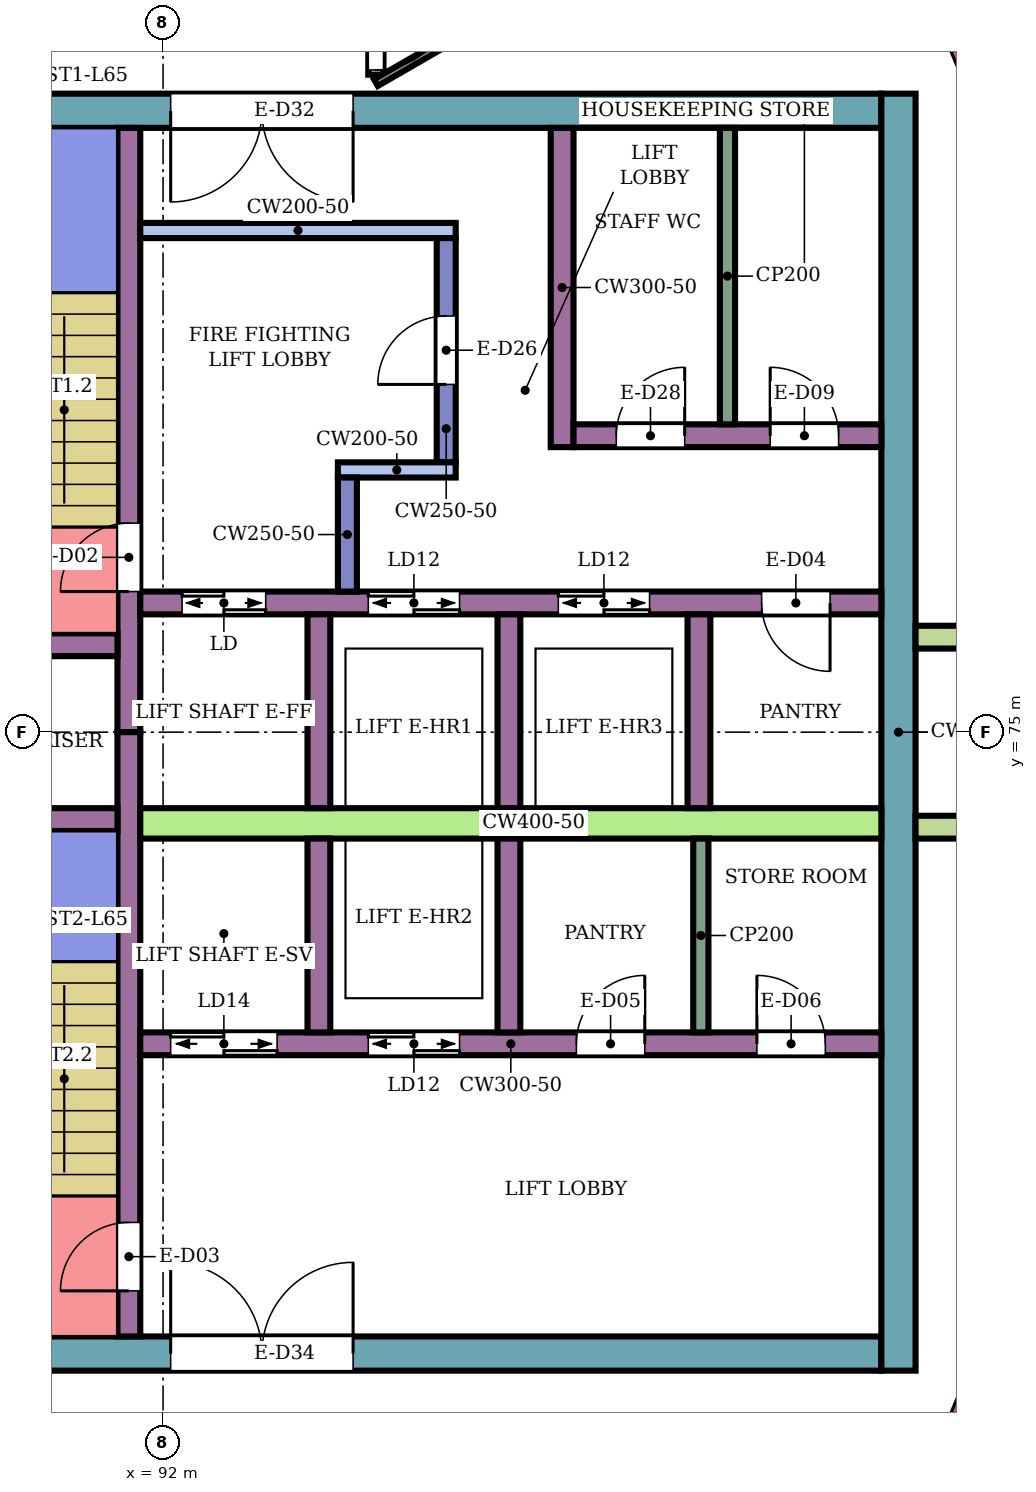
"""IFC4 building model, lengths in metres.
Left out: names, types, materials, properties, quantities, classifications, styles, units other than length and angle.
Written with IfcOpenShell. Run it as: python <this file> out.ifc"""

import sys

from ifc_helpers import new_model, si_unit, direction, frame, frame_2d, origin, place, context, subcontext, project, spatial, rectangle, extrude, element, fill, save


model = new_model("IFC4")
c1 = context("Model", 3, precision=1e-05, world=origin(), true_north=direction((0.0, 1.0)))
c2 = subcontext(c1, "Body", "Model", "MODEL_VIEW")
j1 = project(units=[si_unit("LENGTHUNIT", "METRE"), si_unit("PLANEANGLEUNIT", "RADIAN")], contexts=[c1])
p1 = place(None, origin())
s1 = spatial("IfcSite", under=j1, at=p1, CompositionType="ELEMENT")
p2 = place(p1, origin())
s2 = spatial("IfcBuilding", under=s1, at=p2, CompositionType="ELEMENT")
p3 = place(p2, frame((0.0, 0.0, 284.1)))
s3 = spatial("IfcBuildingStorey", under=s2, at=p3, CompositionType="ELEMENT", Elevation=284.1)
p4 = place(p3, frame((87.9, 83.175, 0.0), z_axis=(0.0, 0.0, 1.0), x_axis=(1.0, 0.0, 0.0)))
e1 = element("IfcWall", 1, at=p4, inside=s3, PredefinedType="SHEAR", context=c2, shape_type="SweptSolid", body=[
    extrude(rectangle(XDim=13.55, YDim=0.45, at=frame_2d((6.775, 0.0))), origin(), (0.0, 0.0, 1.0), 3.88),
])
p5 = place(p4, frame((4.2, 0.0, 0.0)))
e2 = element("IfcOpeningElement", 2, at=p5, cuts=e1, PredefinedType="OPENING", context=c2, shape_type="SweptSolid", body=[
    extrude(rectangle(XDim=2.4, YDim=2.4, at=frame_2d((1.2, 1.2))), frame((0.0, 0.235, 0.0), z_axis=(0.0, -1.0, 0.0), x_axis=(1.0, 0.0, 0.0)), (0.0, 0.0, 1.0), 0.47),
])
p6 = place(p3, frame((87.9, 66.825, 0.0), z_axis=(0.0, 0.0, 1.0), x_axis=(1.0, 0.0, 0.0)))
e3 = element("IfcWall", 3, at=p6, inside=s3, PredefinedType="SHEAR", context=c2, shape_type="SweptSolid", body=[
    extrude(rectangle(XDim=13.55, YDim=0.45, at=frame_2d((6.775, 0.0))), origin(), (0.0, 0.0, 1.0), 3.88),
])
p7 = place(p6, frame((4.2, 0.0, 0.0)))
e4 = element("IfcOpeningElement", 4, at=p7, cuts=e3, PredefinedType="OPENING", context=c2, shape_type="SweptSolid", body=[
    extrude(rectangle(XDim=2.4, YDim=2.4, at=frame_2d((1.2, 1.2))), frame((0.0, 0.235, 0.0), z_axis=(0.0, -1.0, 0.0), x_axis=(1.0, 0.0, 0.0)), (0.0, 0.0, 1.0), 0.47),
])
p8 = place(p3, frame((101.675, 66.6, 0.0), z_axis=(0.0, 0.0, 1.0), x_axis=(0.0, 1.0, 0.0)))
e5 = element("IfcWall", 5, at=p8, inside=s3, PredefinedType="SHEAR", context=c2, shape_type="SweptSolid", body=[
    extrude(rectangle(XDim=16.8, YDim=0.45, at=frame_2d((8.4, 0.0))), origin(), (0.0, 0.0, 1.0), 3.88),
])
p9 = place(p3, frame((91.55, 75.0, 0.0), z_axis=(0.0, 0.0, 1.0), x_axis=(0.0, 1.0, 0.0)))
e6 = element("IfcWall", 6, at=p9, inside=s3, PredefinedType="SHEAR", context=c2, shape_type="SweptSolid", body=[
    extrude(rectangle(XDim=7.95, YDim=0.3, at=frame_2d((3.975, 0.0))), origin(), (0.0, 0.0, 1.0), 3.88),
])
p10 = place(p9, frame((1.85, 0.0, 0.0)))
e7 = element("IfcOpeningElement", 7, at=p10, cuts=e6, PredefinedType="OPENING", context=c2, shape_type="SweptSolid", body=[
    extrude(rectangle(XDim=0.9, YDim=2.1, at=frame_2d((0.45, 1.05))), frame((0.0, 0.16, 0.0), z_axis=(0.0, -1.0, 0.0), x_axis=(1.0, 0.0, 0.0)), (0.0, 0.0, 1.0), 0.32),
])
p11 = place(p3, frame((91.55, 67.05, 0.0), z_axis=(0.0, 0.0, 1.0), x_axis=(0.0, 1.0, 0.0)))
e8 = element("IfcWall", 8, at=p11, inside=s3, PredefinedType="SHEAR", context=c2, shape_type="SweptSolid", body=[
    extrude(rectangle(XDim=7.95, YDim=0.3, at=frame_2d((3.975, 0.0))), origin(), (0.0, 0.0, 1.0), 3.88),
])
p12 = place(p11, frame((0.6, 0.0, 0.0)))
e9 = element("IfcOpeningElement", 9, at=p12, cuts=e8, PredefinedType="OPENING", context=c2, shape_type="SweptSolid", body=[
    extrude(rectangle(XDim=0.9, YDim=2.1, at=frame_2d((0.45, 1.05))), frame((0.0, 0.16, 0.0), z_axis=(0.0, -1.0, 0.0), x_axis=(1.0, 0.0, 0.0)), (0.0, 0.0, 1.0), 0.32),
])
p13 = place(p3, frame((88.35, 76.15, 0.0), z_axis=(0.0, 0.0, 1.0), x_axis=(1.0, 0.0, 0.0)))
e10 = element("IfcWall", 10, at=p13, inside=s3, PredefinedType="SHEAR", context=c2, shape_type="SweptSolid", body=[
    extrude(rectangle(XDim=3.05, YDim=0.3, at=frame_2d((1.525, 0.0))), origin(), (0.0, 0.0, 1.0), 3.88),
])
p14 = place(p13, frame((1.1, 0.0, 0.0)))
e11 = element("IfcOpeningElement", 11, at=p14, cuts=e10, PredefinedType="OPENING", context=c2, shape_type="SweptSolid", body=[
    extrude(rectangle(XDim=0.7, YDim=2.0, at=frame_2d((0.35, 1.0))), frame((0.0, 0.16, 0.0), z_axis=(0.0, -1.0, 0.0), x_axis=(1.0, 0.0, 0.0)), (0.0, 0.0, 1.0), 0.32),
])
p15 = place(p3, frame((88.35, 73.85, 0.0), z_axis=(0.0, 0.0, 1.0), x_axis=(1.0, 0.0, 0.0)))
e12 = element("IfcWall", 12, at=p15, inside=s3, PredefinedType="SHEAR", context=c2, shape_type="SweptSolid", body=[
    extrude(rectangle(XDim=3.05, YDim=0.3, at=frame_2d((1.525, 0.0))), origin(), (0.0, 0.0, 1.0), 3.88),
])
p16 = place(p3, frame((91.7, 76.7, 0.0), z_axis=(0.0, 0.0, 1.0), x_axis=(1.0, 0.0, 0.0)))
e13 = element("IfcWall", 13, at=p16, inside=s3, PredefinedType="SHEAR", context=c2, shape_type="SweptSolid", body=[
    extrude(rectangle(XDim=9.75, YDim=0.3, at=frame_2d((4.875, 0.0))), origin(), (0.0, 0.0, 1.0), 3.88),
])
p17 = place(p16, frame((0.55, 0.0, 0.0)))
e14 = element("IfcOpeningElement", 14, at=p17, cuts=e13, PredefinedType="OPENING", context=c2, shape_type="SweptSolid", body=[
    extrude(rectangle(XDim=1.1, YDim=2.1, at=frame_2d((0.55, 1.05))), frame((0.0, 0.16, 0.0), z_axis=(0.0, -1.0, 0.0), x_axis=(1.0, 0.0, 0.0)), (0.0, 0.0, 1.0), 0.32),
])
p18 = place(p16, frame((3.0, 0.0, 0.0)))
e15 = element("IfcOpeningElement", 15, at=p18, cuts=e13, PredefinedType="OPENING", context=c2, shape_type="SweptSolid", body=[
    extrude(rectangle(XDim=1.2, YDim=2.1, at=frame_2d((0.6, 1.05))), frame((0.0, 0.16, 0.0), z_axis=(0.0, -1.0, 0.0), x_axis=(1.0, 0.0, 0.0)), (0.0, 0.0, 1.0), 0.32),
])
p19 = place(p16, frame((5.5, 0.0, 0.0)))
e16 = element("IfcOpeningElement", 16, at=p19, cuts=e13, PredefinedType="OPENING", context=c2, shape_type="SweptSolid", body=[
    extrude(rectangle(XDim=1.2, YDim=2.1, at=frame_2d((0.6, 1.05))), frame((0.0, 0.16, 0.0), z_axis=(0.0, -1.0, 0.0), x_axis=(1.0, 0.0, 0.0)), (0.0, 0.0, 1.0), 0.32),
])
p20 = place(p16, frame((8.175, 0.0, 0.0)))
e17 = element("IfcOpeningElement", 17, at=p20, cuts=e13, PredefinedType="OPENING", context=c2, shape_type="SweptSolid", body=[
    extrude(rectangle(XDim=0.9, YDim=2.1, at=frame_2d((0.45, 1.05))), frame((0.0, 0.16, 0.0), z_axis=(0.0, -1.0, 0.0), x_axis=(1.0, 0.0, 0.0)), (0.0, 0.0, 1.0), 0.32),
])
p21 = place(p3, frame((91.7, 73.8, 0.0), z_axis=(0.0, 0.0, 1.0), x_axis=(1.0, 0.0, 0.0)))
e18 = element("IfcWall", 18, at=p21, inside=s3, PredefinedType="SHEAR", context=c2, shape_type="SweptSolid", body=[
    extrude(rectangle(XDim=9.75, YDim=0.4, at=frame_2d((4.875, 0.0))), origin(), (0.0, 0.0, 1.0), 3.88),
])
p22 = place(p3, frame((91.7, 70.9, 0.0), z_axis=(0.0, 0.0, 1.0), x_axis=(1.0, 0.0, 0.0)))
e19 = element("IfcWall", 19, at=p22, inside=s3, PredefinedType="SHEAR", context=c2, shape_type="SweptSolid", body=[
    extrude(rectangle(XDim=9.75, YDim=0.3, at=frame_2d((4.875, 0.0))), origin(), (0.0, 0.0, 1.0), 3.88),
])
p23 = place(p22, frame((0.4, 0.0, 0.0)))
e20 = element("IfcOpeningElement", 20, at=p23, cuts=e19, PredefinedType="OPENING", context=c2, shape_type="SweptSolid", body=[
    extrude(rectangle(XDim=1.4, YDim=2.1, at=frame_2d((0.7, 1.05))), frame((0.0, 0.16, 0.0), z_axis=(0.0, -1.0, 0.0), x_axis=(1.0, 0.0, 0.0)), (0.0, 0.0, 1.0), 0.32),
])
p24 = place(p22, frame((3.0, 0.0, 0.0)))
e21 = element("IfcOpeningElement", 21, at=p24, cuts=e19, PredefinedType="OPENING", context=c2, shape_type="SweptSolid", body=[
    extrude(rectangle(XDim=1.2, YDim=2.1, at=frame_2d((0.6, 1.05))), frame((0.0, 0.16, 0.0), z_axis=(0.0, -1.0, 0.0), x_axis=(1.0, 0.0, 0.0)), (0.0, 0.0, 1.0), 0.32),
])
p25 = place(p22, frame((5.738, 0.0, 0.0)))
e22 = element("IfcOpeningElement", 22, at=p25, cuts=e19, PredefinedType="OPENING", context=c2, shape_type="SweptSolid", body=[
    extrude(rectangle(XDim=0.9, YDim=2.1, at=frame_2d((0.45, 1.05))), frame((0.0, 0.16, 0.0), z_axis=(0.0, -1.0, 0.0), x_axis=(1.0, 0.0, 0.0)), (0.0, 0.0, 1.0), 0.32),
])
p26 = place(p22, frame((8.113, 0.0, 0.0)))
e23 = element("IfcOpeningElement", 23, at=p26, cuts=e19, PredefinedType="OPENING", context=c2, shape_type="SweptSolid", body=[
    extrude(rectangle(XDim=0.9, YDim=2.1, at=frame_2d((0.45, 1.05))), frame((0.0, 0.16, 0.0), z_axis=(0.0, -1.0, 0.0), x_axis=(1.0, 0.0, 0.0)), (0.0, 0.0, 1.0), 0.32),
])
for number, where, z_axis, x_axis in (
    (24, (94.05, 74.0, 0.0), (0.0, 0.0, 1.0), (0.0, 1.0, 0.0)),
    (25, (96.55, 74.0, 0.0), (0.0, 0.0, 1.0), (0.0, 1.0, 0.0)),
    (26, (99.05, 74.0, 0.0), (0.0, 0.0, 1.0), (0.0, 1.0, 0.0)),
    (27, (94.05, 71.05, 0.0), (0.0, 0.0, 1.0), (0.0, 1.0, 0.0)),
    (28, (96.55, 71.05, 0.0), (0.0, 0.0, 1.0), (0.0, 1.0, 0.0)),
):
    element("IfcWall", number, at=place(p3, frame(where, z_axis=z_axis, x_axis=x_axis)), inside=s3, PredefinedType="SHEAR", context=c2, shape_type="SweptSolid", body=[
        extrude(rectangle(XDim=2.55, YDim=0.3, at=frame_2d((1.275, 0.0))), origin(), (0.0, 0.0, 1.0), 3.88),
    ])
p27 = place(p3, frame((91.7, 81.6, 0.0), z_axis=(0.0, 0.0, 1.0), x_axis=(1.0, 0.0, 0.0)))
e29 = element("IfcWall", 29, at=p27, inside=s3, PredefinedType="SHEAR", context=c2, shape_type="SweptSolid", body=[
    extrude(rectangle(XDim=4.15, YDim=0.2, at=frame_2d((2.075, 0.0))), origin(), (0.0, 0.0, 1.0), 3.88),
])
p28 = place(p3, frame((95.725, 78.55, 0.0), z_axis=(0.0, 0.0, 1.0), x_axis=(0.0, 1.0, 0.0)))
e30 = element("IfcWall", 30, at=p28, inside=s3, PredefinedType="SHEAR", context=c2, shape_type="SweptSolid", body=[
    extrude(rectangle(XDim=2.95, YDim=0.25, at=frame_2d((1.475, 0.0))), origin(), (0.0, 0.0, 1.0), 3.88),
])
p29 = place(p28, frame((1.025, 0.0, 0.0)))
e31 = element("IfcOpeningElement", 31, at=p29, cuts=e30, PredefinedType="OPENING", context=c2, shape_type="SweptSolid", body=[
    extrude(rectangle(XDim=0.9, YDim=2.1, at=frame_2d((0.45, 1.05))), frame((0.0, 0.135, 0.0), z_axis=(0.0, -1.0, 0.0), x_axis=(1.0, 0.0, 0.0)), (0.0, 0.0, 1.0), 0.27),
])
p30 = place(p3, frame((94.3, 78.45, 0.0), z_axis=(0.0, 0.0, 1.0), x_axis=(1.0, 0.0, 0.0)))
e32 = element("IfcWall", 32, at=p30, inside=s3, PredefinedType="SHEAR", context=c2, shape_type="SweptSolid", body=[
    extrude(rectangle(XDim=1.55, YDim=0.2, at=frame_2d((0.775, 0.0))), origin(), (0.0, 0.0, 1.0), 3.88),
])
p31 = place(p3, frame((94.425, 76.85, 0.0), z_axis=(0.0, 0.0, 1.0), x_axis=(0.0, 1.0, 0.0)))
e33 = element("IfcWall", 33, at=p31, inside=s3, PredefinedType="SHEAR", context=c2, shape_type="SweptSolid", body=[
    extrude(rectangle(XDim=1.5, YDim=0.25, at=frame_2d((0.75, 0.0))), origin(), (0.0, 0.0, 1.0), 3.88),
])
p32 = place(p3, frame((97.25, 78.75, 0.0), z_axis=(0.0, 0.0, 1.0), x_axis=(0.0, 1.0, 0.0)))
e34 = element("IfcWall", 34, at=p32, inside=s3, PredefinedType="SHEAR", context=c2, shape_type="SweptSolid", body=[
    extrude(rectangle(XDim=4.2, YDim=0.3, at=frame_2d((2.1, 0.0))), origin(), (0.0, 0.0, 1.0), 3.88),
])
p33 = place(p3, frame((97.4, 78.9, 0.0), z_axis=(0.0, 0.0, 1.0), x_axis=(1.0, 0.0, 0.0)))
e35 = element("IfcWall", 35, at=p33, inside=s3, PredefinedType="SHEAR", context=c2, shape_type="SweptSolid", body=[
    extrude(rectangle(XDim=4.05, YDim=0.3, at=frame_2d((2.025, 0.0))), origin(), (0.0, 0.0, 1.0), 3.88),
])
p34 = place(p33, frame((0.562, 0.0, 0.0)))
e36 = element("IfcOpeningElement", 36, at=p34, cuts=e35, PredefinedType="OPENING", context=c2, shape_type="SweptSolid", body=[
    extrude(rectangle(XDim=0.9, YDim=2.1, at=frame_2d((0.45, 1.05))), frame((0.0, 0.16, 0.0), z_axis=(0.0, -1.0, 0.0), x_axis=(1.0, 0.0, 0.0)), (0.0, 0.0, 1.0), 0.32),
])
p35 = place(p33, frame((2.587, 0.0, 0.0)))
e37 = element("IfcOpeningElement", 37, at=p35, cuts=e35, PredefinedType="OPENING", context=c2, shape_type="SweptSolid", body=[
    extrude(rectangle(XDim=0.9, YDim=2.1, at=frame_2d((0.45, 1.05))), frame((0.0, 0.16, 0.0), z_axis=(0.0, -1.0, 0.0), x_axis=(1.0, 0.0, 0.0)), (0.0, 0.0, 1.0), 0.32),
])
for number, where, z_axis, x_axis in (
    (38, (101.9, 73.75, 0.0), (0.0, 0.0, 1.0), (1.0, 0.0, 0.0)),
    (39, (101.9, 76.25, 0.0), (0.0, 0.0, 1.0), (1.0, 0.0, 0.0)),
):
    element("IfcWall", number, at=place(p3, frame(where, z_axis=z_axis, x_axis=x_axis)), inside=s3, PredefinedType="NOTDEFINED", context=c2, shape_type="SweptSolid", body=[
        extrude(rectangle(XDim=2.416, YDim=0.3, at=frame_2d((1.208, 0.0))), origin(), (0.0, 0.0, 1.0), 4.2),
    ])
p36 = place(p3, frame((94.8, 83.65, 0.0), z_axis=(0.0, 0.0, 1.0), x_axis=(0.0, 1.0, 0.0)))
e40 = element("IfcWall", 40, at=p36, inside=s3, PredefinedType="PARTITIONING", context=c2, shape_type="SweptSolid", body=[
    extrude(rectangle(XDim=1.25, YDim=0.2, at=frame_2d((0.625, 0.0))), origin(), (0.0, 0.0, 1.0), 3.75),
])
p37 = place(p36, frame((0.062, 0.0, 0.0)))
e41 = element("IfcOpeningElement", 41, at=p37, cuts=e40, PredefinedType="OPENING", context=c2, shape_type="SweptSolid", body=[
    extrude(rectangle(XDim=1.0, YDim=2.1, at=frame_2d((0.5, 1.05))), frame((0.0, 0.11, 0.0), z_axis=(0.0, -1.0, 0.0), x_axis=(1.0, 0.0, 0.0)), (0.0, 0.0, 1.0), 0.22),
])
p38 = place(p3, frame((94.8, 83.545, 0.0), z_axis=(0.0, 0.0, 1.0), x_axis=(0.866044015472, 0.499967762227, 0.0)))
e42 = element("IfcWall", 42, at=p38, inside=s3, PredefinedType="PARTITIONING", context=c2, shape_type="SweptSolid", body=[
    extrude(rectangle(XDim=7.208, YDim=0.1, at=frame_2d((3.604, 0.0))), origin(), (0.0, 0.0, 1.0), 3.75),
])
p39 = place(p38, frame((3.129, 0.0, 0.0)))
e43 = element("IfcOpeningElement", 43, at=p39, cuts=e42, PredefinedType="OPENING", context=c2, shape_type="SweptSolid", body=[
    extrude(rectangle(XDim=0.9, YDim=2.1, at=frame_2d((0.45, 1.05))), frame((0.0, 0.06, 0.0), z_axis=(0.0, -1.0, 0.0), x_axis=(1.0, 0.0, 0.0)), (0.0, 0.0, 1.0), 0.12),
])
p40 = place(p3, frame((99.075, 71.05, 0.0), z_axis=(0.0, 0.0, 1.0), x_axis=(0.0, 1.0, 0.0)))
e44 = element("IfcWall", 44, at=p40, inside=s3, PredefinedType="PARTITIONING", context=c2, shape_type="SweptSolid", body=[
    extrude(rectangle(XDim=2.55, YDim=0.2, at=frame_2d((1.275, 0.0))), origin(), (0.0, 0.0, 1.0), 3.88),
])
p41 = place(p3, frame((99.425, 79.05, 0.0), z_axis=(0.0, 0.0, 1.0), x_axis=(0.0, 1.0, 0.0)))
e45 = element("IfcWall", 45, at=p41, inside=s3, PredefinedType="PARTITIONING", context=c2, shape_type="SweptSolid", body=[
    extrude(rectangle(XDim=3.9, YDim=0.2, at=frame_2d((1.95, 0.0))), origin(), (0.0, 0.0, 1.0), 3.88),
])
p42 = place(p37, frame((1.0, 0.0, 0.0), z_axis=(0.0, 0.0, 1.0), x_axis=(-1.0, 0.0, 0.0)))
e46 = element("IfcDoor", 46, at=p42, inside=s3, OperationType="SINGLE_SWING_LEFT", PredefinedType="DOOR", context=c2, shape_type="SweptSolid", body=[
    extrude(rectangle(XDim=1.0, YDim=2.1, at=frame_2d((0.5, 1.05))), frame((0.0, 0.025, 0.0), z_axis=(0.0, -1.0, 0.0), x_axis=(1.0, 0.0, 0.0)), (0.0, 0.0, 1.0), 0.05),
])
fill(e41, e46)
p43 = place(p10, origin())
e47 = element("IfcDoor", 47, at=p43, inside=s3, OperationType="SINGLE_SWING_LEFT", PredefinedType="DOOR", context=c2, shape_type="SweptSolid", body=[
    extrude(rectangle(XDim=0.9, YDim=2.1, at=frame_2d((0.45, 1.05))), frame((0.0, 0.025, 0.0), z_axis=(0.0, -1.0, 0.0), x_axis=(1.0, 0.0, 0.0)), (0.0, 0.0, 1.0), 0.05),
])
fill(e7, e47)
p44 = place(p12, origin())
e48 = element("IfcDoor", 48, at=p44, inside=s3, OperationType="SINGLE_SWING_LEFT", PredefinedType="DOOR", context=c2, shape_type="SweptSolid", body=[
    extrude(rectangle(XDim=0.9, YDim=2.1, at=frame_2d((0.45, 1.05))), frame((0.0, 0.025, 0.0), z_axis=(0.0, -1.0, 0.0), x_axis=(1.0, 0.0, 0.0)), (0.0, 0.0, 1.0), 0.05),
])
fill(e9, e48)
p45 = place(p17, origin())
e49 = element("IfcDoor", 49, at=p45, inside=s3, OperationType="DOUBLE_DOOR_SLIDING", PredefinedType="DOOR", context=c2, shape_type="SweptSolid", body=[
    extrude(rectangle(XDim=1.1, YDim=2.1, at=frame_2d((0.55, 1.05))), frame((0.0, 0.025, 0.0), z_axis=(0.0, -1.0, 0.0), x_axis=(1.0, 0.0, 0.0)), (0.0, 0.0, 1.0), 0.05),
])
fill(e14, e49)
p46 = place(p18, origin())
e50 = element("IfcDoor", 50, at=p46, inside=s3, OperationType="DOUBLE_DOOR_SLIDING", PredefinedType="DOOR", context=c2, shape_type="SweptSolid", body=[
    extrude(rectangle(XDim=1.2, YDim=2.1, at=frame_2d((0.6, 1.05))), frame((0.0, 0.025, 0.0), z_axis=(0.0, -1.0, 0.0), x_axis=(1.0, 0.0, 0.0)), (0.0, 0.0, 1.0), 0.05),
])
fill(e15, e50)
p47 = place(p19, origin())
e51 = element("IfcDoor", 51, at=p47, inside=s3, OperationType="DOUBLE_DOOR_SLIDING", PredefinedType="DOOR", context=c2, shape_type="SweptSolid", body=[
    extrude(rectangle(XDim=1.2, YDim=2.1, at=frame_2d((0.6, 1.05))), frame((0.0, 0.025, 0.0), z_axis=(0.0, -1.0, 0.0), x_axis=(1.0, 0.0, 0.0)), (0.0, 0.0, 1.0), 0.05),
])
fill(e16, e51)
p48 = place(p20, frame((0.9, 0.0, 0.0), z_axis=(0.0, 0.0, 1.0), x_axis=(-1.0, 0.0, 0.0)))
e52 = element("IfcDoor", 52, at=p48, inside=s3, OperationType="SINGLE_SWING_LEFT", PredefinedType="DOOR", context=c2, shape_type="SweptSolid", body=[
    extrude(rectangle(XDim=0.9, YDim=2.1, at=frame_2d((0.45, 1.05))), frame((0.0, 0.025, 0.0), z_axis=(0.0, -1.0, 0.0), x_axis=(1.0, 0.0, 0.0)), (0.0, 0.0, 1.0), 0.05),
])
fill(e17, e52)
p49 = place(p23, origin())
e53 = element("IfcDoor", 53, at=p49, inside=s3, OperationType="DOUBLE_DOOR_SLIDING", PredefinedType="DOOR", context=c2, shape_type="SweptSolid", body=[
    extrude(rectangle(XDim=1.4, YDim=2.1, at=frame_2d((0.7, 1.05))), frame((0.0, 0.025, 0.0), z_axis=(0.0, -1.0, 0.0), x_axis=(1.0, 0.0, 0.0)), (0.0, 0.0, 1.0), 0.05),
])
fill(e20, e53)
p50 = place(p24, origin())
e54 = element("IfcDoor", 54, at=p50, inside=s3, OperationType="DOUBLE_DOOR_SLIDING", PredefinedType="DOOR", context=c2, shape_type="SweptSolid", body=[
    extrude(rectangle(XDim=1.2, YDim=2.1, at=frame_2d((0.6, 1.05))), frame((0.0, 0.025, 0.0), z_axis=(0.0, -1.0, 0.0), x_axis=(1.0, 0.0, 0.0)), (0.0, 0.0, 1.0), 0.05),
])
fill(e21, e54)
p51 = place(p25, origin())
e55 = element("IfcDoor", 55, at=p51, inside=s3, OperationType="SINGLE_SWING_RIGHT", PredefinedType="DOOR", context=c2, shape_type="SweptSolid", body=[
    extrude(rectangle(XDim=0.9, YDim=2.1, at=frame_2d((0.45, 1.05))), frame((0.0, 0.025, 0.0), z_axis=(0.0, -1.0, 0.0), x_axis=(1.0, 0.0, 0.0)), (0.0, 0.0, 1.0), 0.05),
])
fill(e22, e55)
p52 = place(p26, origin())
e56 = element("IfcDoor", 56, at=p52, inside=s3, OperationType="SINGLE_SWING_LEFT", PredefinedType="DOOR", context=c2, shape_type="SweptSolid", body=[
    extrude(rectangle(XDim=0.9, YDim=2.1, at=frame_2d((0.45, 1.05))), frame((0.0, 0.025, 0.0), z_axis=(0.0, -1.0, 0.0), x_axis=(1.0, 0.0, 0.0)), (0.0, 0.0, 1.0), 0.05),
])
fill(e23, e56)
p53 = place(p29, origin())
e57 = element("IfcDoor", 57, at=p53, inside=s3, OperationType="SINGLE_SWING_LEFT", PredefinedType="DOOR", context=c2, shape_type="SweptSolid", body=[
    extrude(rectangle(XDim=0.9, YDim=2.1, at=frame_2d((0.45, 1.05))), frame((0.0, 0.025, 0.0), z_axis=(0.0, -1.0, 0.0), x_axis=(1.0, 0.0, 0.0)), (0.0, 0.0, 1.0), 0.05),
])
fill(e31, e57)
p54 = place(p34, origin())
e58 = element("IfcDoor", 58, at=p54, inside=s3, OperationType="SINGLE_SWING_RIGHT", PredefinedType="DOOR", context=c2, shape_type="SweptSolid", body=[
    extrude(rectangle(XDim=0.9, YDim=2.1, at=frame_2d((0.45, 1.05))), frame((0.0, 0.025, 0.0), z_axis=(0.0, -1.0, 0.0), x_axis=(1.0, 0.0, 0.0)), (0.0, 0.0, 1.0), 0.05),
])
fill(e36, e58)
p55 = place(p35, origin())
e59 = element("IfcDoor", 59, at=p55, inside=s3, OperationType="SINGLE_SWING_LEFT", PredefinedType="DOOR", context=c2, shape_type="SweptSolid", body=[
    extrude(rectangle(XDim=0.9, YDim=2.1, at=frame_2d((0.45, 1.05))), frame((0.0, 0.025, 0.0), z_axis=(0.0, -1.0, 0.0), x_axis=(1.0, 0.0, 0.0)), (0.0, 0.0, 1.0), 0.05),
])
fill(e37, e59)
p56 = place(p5, frame((2.4, 0.0, 0.0), z_axis=(0.0, 0.0, 1.0), x_axis=(-1.0, 0.0, 0.0)))
e60 = element("IfcDoor", 60, at=p56, inside=s3, OperationType="DOUBLE_DOOR_SINGLE_SWING", PredefinedType="DOOR", context=c2, shape_type="SweptSolid", body=[
    extrude(rectangle(XDim=2.4, YDim=2.4, at=frame_2d((1.2, 1.2))), frame((0.0, 0.025, 0.0), z_axis=(0.0, -1.0, 0.0), x_axis=(1.0, 0.0, 0.0)), (0.0, 0.0, 1.0), 0.05),
])
fill(e2, e60)
p57 = place(p7, origin())
e61 = element("IfcDoor", 61, at=p57, inside=s3, OperationType="DOUBLE_DOOR_SINGLE_SWING", PredefinedType="DOOR", context=c2, shape_type="SweptSolid", body=[
    extrude(rectangle(XDim=2.4, YDim=2.4, at=frame_2d((1.2, 1.2))), frame((0.0, 0.025, 0.0), z_axis=(0.0, -1.0, 0.0), x_axis=(1.0, 0.0, 0.0)), (0.0, 0.0, 1.0), 0.05),
])
fill(e4, e61)
save(model, sys.argv[1])
